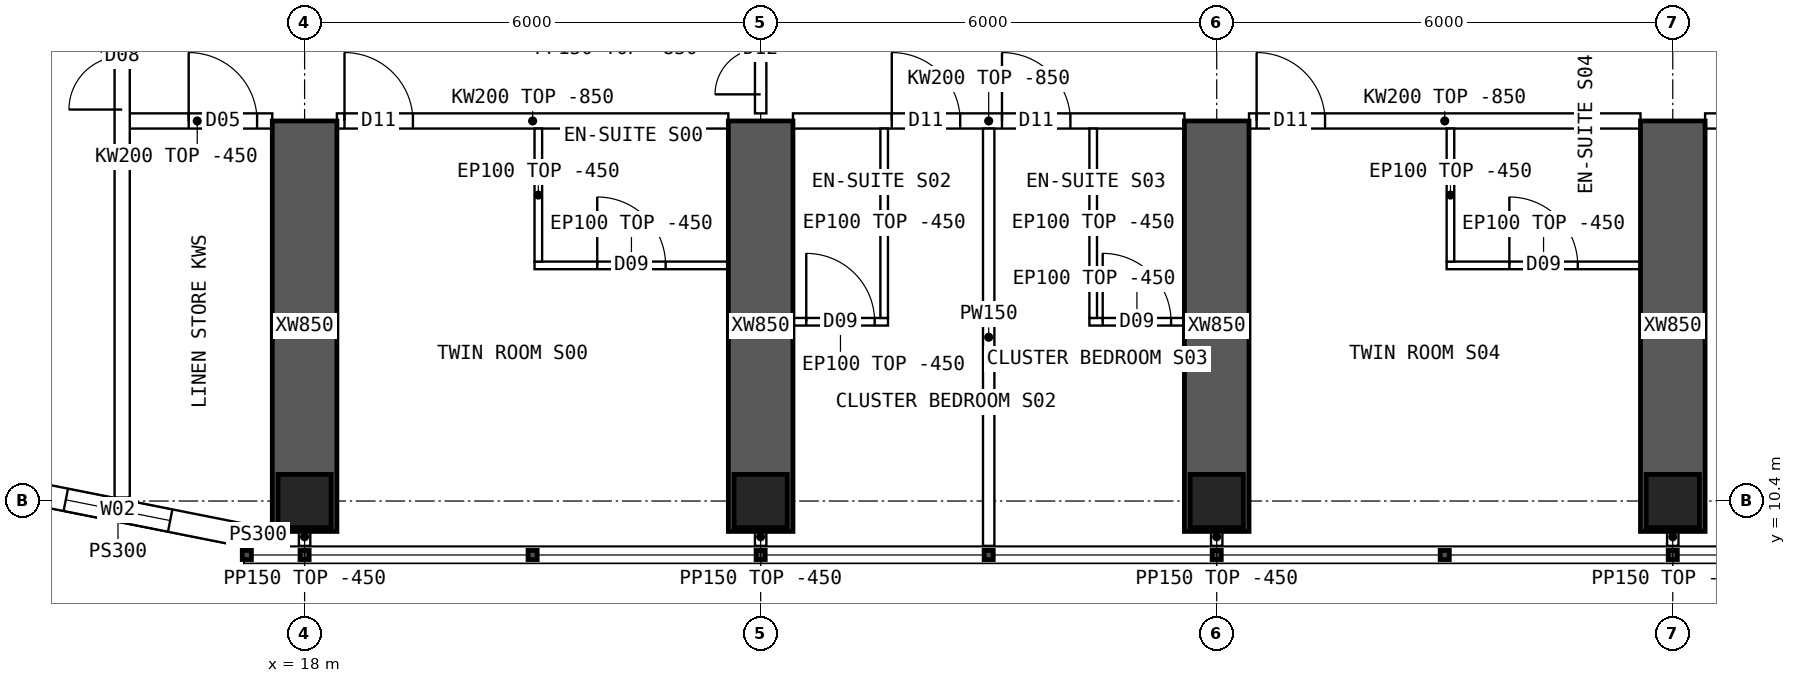
"""IFC4 building model, lengths in metres.
Left out: names, types, materials, properties, quantities, classifications, styles, units other than length and angle.
Written with IfcOpenShell. Run it as: python <this file> out.ifc"""

import sys

from ifc_helpers import new_model, si_unit, direction, frame, frame_2d, origin, origin_2d, place, context, subcontext, project, spatial, polyline, rectangle, hollow_rectangle, outline, extrude, element, fill, save


model = new_model("IFC4")
c1 = context("Model", 3, precision=1e-05, world=origin(), true_north=direction((0.0, 1.0)))
c2 = subcontext(c1, "Body", "Model", "MODEL_VIEW")
j1 = project(units=[si_unit("LENGTHUNIT", "METRE"), si_unit("PLANEANGLEUNIT", "RADIAN")], contexts=[c1])
p1 = place(None, origin())
s1 = spatial("IfcSite", under=j1, at=p1, CompositionType="ELEMENT")
p2 = place(p1, origin())
s2 = spatial("IfcBuilding", under=s1, at=p2, CompositionType="ELEMENT")
p3 = place(p2, frame((0.0, 0.0, 189.85)))
s3 = spatial("IfcBuildingStorey", under=s2, at=p3, CompositionType="ELEMENT", Elevation=189.85)
for number, where, z_axis, x_axis in (
    (1, (18.0, 10.4, 0.0), (0.0, 0.0, 1.0), (1.0, 0.0, 0.0)),
    (2, (24.0, 10.4, 0.0), (0.0, 0.0, 1.0), (1.0, 0.0, 0.0)),
    (3, (30.0, 10.4, 0.0), (0.0, 0.0, 1.0), (1.0, 0.0, 0.0)),
    (4, (36.0, 10.4, 0.0), (0.0, 0.0, 1.0), (1.0, 0.0, 0.0)),
):
    element("IfcColumn", number, at=place(p3, frame(where, z_axis=z_axis, x_axis=x_axis)), inside=s3, PredefinedType="COLUMN", context=c2, shape_type="SweptSolid", body=[
        extrude(hollow_rectangle(XDim=0.7, YDim=0.7, WallThickness=0.07, at=origin_2d()), origin(), (0.0, 0.0, 1.0), 3.75),
    ])
for number, where, z_axis, x_axis in (
    (5, (18.0, 10.0, 0.0), (0.0, 0.0, 1.0), (0.0, 1.0, 0.0)),
    (6, (24.0, 10.0, 0.0), (0.0, 0.0, 1.0), (0.0, 1.0, 0.0)),
    (7, (30.0, 10.0, 0.0), (0.0, 0.0, 1.0), (0.0, 1.0, 0.0)),
    (8, (36.0, 10.0, 0.0), (0.0, 0.0, 1.0), (0.0, 1.0, 0.0)),
):
    element("IfcWall", number, at=place(p3, frame(where, z_axis=z_axis, x_axis=x_axis)), inside=s3, PredefinedType="SHEAR", context=c2, shape_type="SweptSolid", body=[
        extrude(rectangle(XDim=5.4, YDim=0.85, at=frame_2d((2.7, 0.0))), origin(), (0.0, 0.0, 1.0), 3.75),
    ])
p4 = place(p3, frame((13.89, 10.608, 0.0), z_axis=(0.0, 0.0, 1.0), x_axis=(0.98078325777, -0.195100490205, 0.0)))
e9 = element("IfcWall", 9, at=p4, inside=s3, PredefinedType="SOLIDWALL", context=c2, shape_type="SweptSolid", body=[
    extrude(outline(polyline([(-0.03, -0.15), (3.405, -0.15), (3.345, 0.15), (0.03, 0.15), (-0.03, -0.15)])), origin(), (0.0, 0.0, 1.0), 3.3),
])
p5 = place(p4, frame((0.988, 0.0, 0.9)))
e10 = element("IfcOpeningElement", 10, at=p5, cuts=e9, PredefinedType="OPENING", context=c2, shape_type="SweptSolid", body=[
    extrude(rectangle(XDim=1.4, YDim=1.8, at=frame_2d((0.7, 0.9))), frame((0.0, 0.16, 0.0), z_axis=(0.0, -1.0, 0.0), x_axis=(1.0, 0.0, 0.0)), (0.0, 0.0, 1.0), 0.32),
])
p6 = place(p3, frame((17.2, 9.95, 0.0), z_axis=(0.0, 0.0, 1.0), x_axis=(1.0, 0.0, 0.0)))
e11 = element("IfcWall", 11, at=p6, inside=s3, PredefinedType="SOLIDWALL", context=c2, shape_type="SweptSolid", body=[
    extrude(rectangle(XDim=0.375, YDim=0.3, at=frame_2d((0.188, 0.0))), origin(), (0.0, 0.0, 1.0), 3.3),
])
p7 = place(p3, frame((15.6, 15.4, 0.0), z_axis=(0.0, 0.0, 1.0), x_axis=(1.0, 0.0, 0.0)))
e12 = element("IfcWall", 12, at=p7, inside=s3, PredefinedType="SOLIDWALL", context=c2, shape_type="SweptSolid", body=[
    extrude(rectangle(XDim=1.975, YDim=0.2, at=frame_2d((0.987, 0.0))), origin(), (0.0, 0.0, 1.0), 3.3),
])
p8 = place(p7, frame((0.875, 0.0, 0.0)))
e13 = element("IfcOpeningElement", 13, at=p8, cuts=e12, PredefinedType="OPENING", context=c2, shape_type="SweptSolid", body=[
    extrude(rectangle(XDim=0.9, YDim=2.1, at=frame_2d((0.45, 1.05))), frame((0.0, 0.11, 0.0), z_axis=(0.0, -1.0, 0.0), x_axis=(1.0, 0.0, 0.0)), (0.0, 0.0, 1.0), 0.22),
])
p9 = place(p3, frame((18.425, 15.4, 0.0), z_axis=(0.0, 0.0, 1.0), x_axis=(1.0, 0.0, 0.0)))
e14 = element("IfcWall", 14, at=p9, inside=s3, PredefinedType="SOLIDWALL", context=c2, shape_type="SweptSolid", body=[
    extrude(outline(polyline([(0.0, 0.0), (5.15, 0.0), (5.15, 2.9), (0.0, 2.9), (0.0, 0.0)])), frame((0.0, 0.1, 0.0), z_axis=(0.0, -1.0, 0.0), x_axis=(1.0, 0.0, 0.0)), (0.0, 0.0, 1.0), 0.2),
])
p10 = place(p9, frame((0.1, 0.0, 0.0)))
e15 = element("IfcOpeningElement", 15, at=p10, cuts=e14, PredefinedType="OPENING", context=c2, shape_type="SweptSolid", body=[
    extrude(rectangle(XDim=0.9, YDim=2.1, at=frame_2d((0.45, 1.05))), frame((0.0, 0.11, 0.0), z_axis=(0.0, -1.0, 0.0), x_axis=(1.0, 0.0, 0.0)), (0.0, 0.0, 1.0), 0.22),
])
p11 = place(p3, frame((24.425, 15.4, 0.0), z_axis=(0.0, 0.0, 1.0), x_axis=(1.0, 0.0, 0.0)))
e16 = element("IfcWall", 16, at=p11, inside=s3, PredefinedType="SOLIDWALL", context=c2, shape_type="SweptSolid", body=[
    extrude(outline(polyline([(0.0, 0.0), (5.15, 0.0), (5.15, 2.9), (0.0, 2.9), (0.0, 0.0)])), frame((0.0, 0.1, 0.0), z_axis=(0.0, -1.0, 0.0), x_axis=(1.0, 0.0, 0.0)), (0.0, 0.0, 1.0), 0.2),
])
p12 = place(p11, frame((1.3, 0.0, 0.0)))
e17 = element("IfcOpeningElement", 17, at=p12, cuts=e16, PredefinedType="OPENING", context=c2, shape_type="SweptSolid", body=[
    extrude(rectangle(XDim=0.9, YDim=2.1, at=frame_2d((0.45, 1.05))), frame((0.0, 0.11, 0.0), z_axis=(0.0, -1.0, 0.0), x_axis=(1.0, 0.0, 0.0)), (0.0, 0.0, 1.0), 0.22),
])
p13 = place(p11, frame((2.75, 0.0, 0.0)))
e18 = element("IfcOpeningElement", 18, at=p13, cuts=e16, PredefinedType="OPENING", context=c2, shape_type="SweptSolid", body=[
    extrude(rectangle(XDim=0.9, YDim=2.1, at=frame_2d((0.45, 1.05))), frame((0.0, 0.11, 0.0), z_axis=(0.0, -1.0, 0.0), x_axis=(1.0, 0.0, 0.0)), (0.0, 0.0, 1.0), 0.22),
])
p14 = place(p3, frame((30.425, 15.4, 0.0), z_axis=(0.0, 0.0, 1.0), x_axis=(1.0, 0.0, 0.0)))
e19 = element("IfcWall", 19, at=p14, inside=s3, PredefinedType="SOLIDWALL", context=c2, shape_type="SweptSolid", body=[
    extrude(outline(polyline([(0.0, 0.0), (5.15, 0.0), (5.15, 2.9), (0.0, 2.9), (0.0, 0.0)])), frame((0.0, 0.1, 0.0), z_axis=(0.0, -1.0, 0.0), x_axis=(1.0, 0.0, 0.0)), (0.0, 0.0, 1.0), 0.2),
])
p15 = place(p14, frame((0.1, 0.0, 0.0)))
e20 = element("IfcOpeningElement", 20, at=p15, cuts=e19, PredefinedType="OPENING", context=c2, shape_type="SweptSolid", body=[
    extrude(rectangle(XDim=0.9, YDim=2.1, at=frame_2d((0.45, 1.05))), frame((0.0, 0.11, 0.0), z_axis=(0.0, -1.0, 0.0), x_axis=(1.0, 0.0, 0.0)), (0.0, 0.0, 1.0), 0.22),
])
p16 = place(p3, frame((36.425, 15.4, 0.0), z_axis=(0.0, 0.0, 1.0), x_axis=(1.0, 0.0, 0.0)))
e21 = element("IfcWall", 21, at=p16, inside=s3, PredefinedType="SOLIDWALL", context=c2, shape_type="SweptSolid", body=[
    extrude(outline(polyline([(0.0, 0.0), (5.15, 0.0), (5.15, 2.9), (0.0, 2.9), (0.0, 0.0)])), frame((0.0, 0.1, 0.0), z_axis=(0.0, -1.0, 0.0), x_axis=(1.0, 0.0, 0.0)), (0.0, 0.0, 1.0), 0.2),
])
p17 = place(p16, frame((0.3, 0.0, 0.0)))
e22 = element("IfcOpeningElement", 22, at=p17, cuts=e21, PredefinedType="OPENING", context=c2, shape_type="SweptSolid", body=[
    extrude(rectangle(XDim=1.0, YDim=2.1, at=frame_2d((0.5, 1.05))), frame((0.0, 0.11, 0.0), z_axis=(0.0, -1.0, 0.0), x_axis=(1.0, 0.0, 0.0)), (0.0, 0.0, 1.0), 0.22),
])
p18 = place(p3, frame((23.575, 13.5, 0.0), z_axis=(0.0, 0.0, 1.0), x_axis=(-1.0, 0.0, 0.0)))
e23 = element("IfcWall", 23, at=p18, inside=s3, PredefinedType="PARTITIONING", context=c2, shape_type="SweptSolid", body=[
    extrude(rectangle(XDim=2.55, YDim=0.1, at=frame_2d((1.275, 0.0))), origin(), (0.0, 0.0, 1.0), 3.3),
])
p19 = place(p18, frame((0.825, 0.0, 0.0)))
e24 = element("IfcOpeningElement", 24, at=p19, cuts=e23, PredefinedType="OPENING", context=c2, shape_type="SweptSolid", body=[
    extrude(rectangle(XDim=0.9, YDim=2.1, at=frame_2d((0.45, 1.05))), frame((0.0, 0.06, 0.0), z_axis=(0.0, -1.0, 0.0), x_axis=(1.0, 0.0, 0.0)), (0.0, 0.0, 1.0), 0.12),
])
p20 = place(p3, frame((21.075, 13.55, 0.0), z_axis=(0.0, 0.0, 1.0), x_axis=(0.0, 1.0, 0.0)))
e25 = element("IfcWall", 25, at=p20, inside=s3, PredefinedType="PARTITIONING", context=c2, shape_type="SweptSolid", body=[
    extrude(outline(polyline([(0.0, 0.0), (1.75, 0.0), (1.75, 2.9), (1.702, 2.9), (1.7, 3.3), (0.0, 3.3), (0.0, 0.0)])), frame((0.0, 0.05, 0.0), z_axis=(0.0, -1.0, 0.0), x_axis=(1.0, 0.0, 0.0)), (0.0, 0.0, 1.0), 0.1),
])
p21 = place(p3, frame((27.0, 9.81, 0.0), z_axis=(0.0, 0.0, 1.0), x_axis=(0.0, 1.0, 0.0)))
e26 = element("IfcWall", 26, at=p21, inside=s3, PredefinedType="PARTITIONING", context=c2, shape_type="SweptSolid", body=[
    extrude(outline(polyline([(0.0, 0.0), (5.49, 0.0), (5.49, 2.9), (5.442, 2.9), (5.44, 3.3), (0.792, 3.3), (0.79, 2.9), (0.392, 2.9), (0.39, 3.3), (0.0, 3.3), (0.0, 0.0)])), frame((0.0, 0.075, 0.0), z_axis=(0.0, -1.0, 0.0), x_axis=(1.0, 0.0, 0.0)), (0.0, 0.0, 1.0), 0.15),
])
p22 = place(p3, frame((25.675, 12.758, 0.0), z_axis=(0.0, 0.0, 1.0), x_axis=(-1.0, 0.0, 0.0)))
e27 = element("IfcWall", 27, at=p22, inside=s3, PredefinedType="PARTITIONING", context=c2, shape_type="SweptSolid", body=[
    extrude(rectangle(XDim=1.25, YDim=0.1, at=frame_2d((0.625, 0.0))), origin(), (0.0, 0.0, 1.0), 3.3),
])
p23 = place(p22, frame((0.175, 0.0, 0.0)))
e28 = element("IfcOpeningElement", 28, at=p23, cuts=e27, PredefinedType="OPENING", context=c2, shape_type="SweptSolid", body=[
    extrude(rectangle(XDim=0.9, YDim=2.1, at=frame_2d((0.45, 1.05))), frame((0.0, 0.06, 0.0), z_axis=(0.0, -1.0, 0.0), x_axis=(1.0, 0.0, 0.0)), (0.0, 0.0, 1.0), 0.12),
])
p24 = place(p3, frame((25.625, 12.808, 0.0), z_axis=(0.0, 0.0, 1.0), x_axis=(0.0, 1.0, 0.0)))
e29 = element("IfcWall", 29, at=p24, inside=s3, PredefinedType="PARTITIONING", context=c2, shape_type="SweptSolid", body=[
    extrude(outline(polyline([(0.0, 0.0), (2.492, 0.0), (2.492, 2.9), (2.444, 2.9), (2.442, 3.3), (0.0, 3.3), (0.0, 0.0)])), frame((0.0, 0.05, 0.0), z_axis=(0.0, -1.0, 0.0), x_axis=(1.0, 0.0, 0.0)), (0.0, 0.0, 1.0), 0.1),
])
p25 = place(p3, frame((29.575, 12.758, 0.0), z_axis=(0.0, 0.0, 1.0), x_axis=(-1.0, 0.0, 0.0)))
e30 = element("IfcWall", 30, at=p25, inside=s3, PredefinedType="PARTITIONING", context=c2, shape_type="SweptSolid", body=[
    extrude(rectangle(XDim=1.25, YDim=0.1, at=frame_2d((0.625, 0.0))), origin(), (0.0, 0.0, 1.0), 3.3),
])
p26 = place(p25, frame((0.175, 0.0, 0.0)))
e31 = element("IfcOpeningElement", 31, at=p26, cuts=e30, PredefinedType="OPENING", context=c2, shape_type="SweptSolid", body=[
    extrude(rectangle(XDim=0.9, YDim=2.1, at=frame_2d((0.45, 1.05))), frame((0.0, 0.06, 0.0), z_axis=(0.0, -1.0, 0.0), x_axis=(1.0, 0.0, 0.0)), (0.0, 0.0, 1.0), 0.12),
])
p27 = place(p3, frame((28.375, 12.808, 0.0), z_axis=(0.0, 0.0, 1.0), x_axis=(0.0, 1.0, 0.0)))
e32 = element("IfcWall", 32, at=p27, inside=s3, PredefinedType="PARTITIONING", context=c2, shape_type="SweptSolid", body=[
    extrude(outline(polyline([(0.0, 0.0), (2.492, 0.0), (2.492, 2.9), (2.444, 2.9), (2.442, 3.3), (0.0, 3.3), (0.0, 0.0)])), frame((0.0, 0.05, 0.0), z_axis=(0.0, -1.0, 0.0), x_axis=(1.0, 0.0, 0.0)), (0.0, 0.0, 1.0), 0.1),
])
p28 = place(p3, frame((35.575, 13.5, 0.0), z_axis=(0.0, 0.0, 1.0), x_axis=(-1.0, 0.0, 0.0)))
e33 = element("IfcWall", 33, at=p28, inside=s3, PredefinedType="PARTITIONING", context=c2, shape_type="SweptSolid", body=[
    extrude(rectangle(XDim=2.55, YDim=0.1, at=frame_2d((1.275, 0.0))), origin(), (0.0, 0.0, 1.0), 3.3),
])
p29 = place(p28, frame((0.825, 0.0, 0.0)))
e34 = element("IfcOpeningElement", 34, at=p29, cuts=e33, PredefinedType="OPENING", context=c2, shape_type="SweptSolid", body=[
    extrude(rectangle(XDim=0.9, YDim=2.1, at=frame_2d((0.45, 1.05))), frame((0.0, 0.06, 0.0), z_axis=(0.0, -1.0, 0.0), x_axis=(1.0, 0.0, 0.0)), (0.0, 0.0, 1.0), 0.12),
])
p30 = place(p3, frame((33.075, 13.55, 0.0), z_axis=(0.0, 0.0, 1.0), x_axis=(0.0, 1.0, 0.0)))
e35 = element("IfcWall", 35, at=p30, inside=s3, PredefinedType="PARTITIONING", context=c2, shape_type="SweptSolid", body=[
    extrude(outline(polyline([(0.0, 0.0), (1.75, 0.0), (1.75, 2.9), (1.702, 2.9), (1.7, 3.3), (0.0, 3.3), (0.0, 0.0)])), frame((0.0, 0.05, 0.0), z_axis=(0.0, -1.0, 0.0), x_axis=(1.0, 0.0, 0.0)), (0.0, 0.0, 1.0), 0.1),
])
p31 = place(p3, frame((24.0, 15.5, 0.0), z_axis=(0.0, 0.0, 1.0), x_axis=(0.0, 1.0, 0.0)))
e36 = element("IfcWall", 36, at=p31, inside=s3, PredefinedType="PARTITIONING", context=c2, shape_type="SweptSolid", body=[
    extrude(outline(polyline([(0.0, 0.0), (1.7, 0.0), (1.7, 2.9), (0.0, 2.9), (0.0, 0.0)])), frame((0.0, 0.075, 0.0), z_axis=(0.0, -1.0, 0.0), x_axis=(1.0, 0.0, 0.0)), (0.0, 0.0, 1.0), 0.15),
])
p32 = place(p31, frame((0.25, 0.0, 0.0)))
e37 = element("IfcOpeningElement", 37, at=p32, cuts=e36, PredefinedType="OPENING", context=c2, shape_type="SweptSolid", body=[
    extrude(rectangle(XDim=1.2, YDim=2.1, at=frame_2d((0.6, 1.05))), frame((0.0, 0.085, 0.0), z_axis=(0.0, -1.0, 0.0), x_axis=(1.0, 0.0, 0.0)), (0.0, 0.0, 1.0), 0.17),
])
p33 = place(p3, frame((15.6, 10.446, 0.0), z_axis=(0.0, 0.0, 1.0), x_axis=(0.0, 1.0, 0.0)))
e38 = element("IfcWall", 38, at=p33, inside=s3, PredefinedType="SOLIDWALL", context=c2, shape_type="SweptSolid", body=[
    extrude(rectangle(XDim=43.107, YDim=0.2, at=frame_2d((21.554, 0.0))), origin(), (0.0, 0.0, 1.0), 3.3),
])
p34 = place(p33, frame((5.104, 0.0, 0.0)))
e39 = element("IfcOpeningElement", 39, at=p34, cuts=e38, PredefinedType="OPENING", context=c2, shape_type="SweptSolid", body=[
    extrude(rectangle(XDim=1.4, YDim=2.1, at=frame_2d((0.7, 1.05))), frame((0.0, 0.11, 0.0), z_axis=(0.0, -1.0, 0.0), x_axis=(1.0, 0.0, 0.0)), (0.0, 0.0, 1.0), 0.22),
])
p35 = place(p33, frame((36.504, 0.0, 0.0)))
e40 = element("IfcOpeningElement", 40, at=p35, cuts=e38, PredefinedType="OPENING", context=c2, shape_type="SweptSolid", body=[
    extrude(rectangle(XDim=1.4, YDim=2.1, at=frame_2d((0.7, 1.05))), frame((0.0, 0.11, 0.0), z_axis=(0.0, -1.0, 0.0), x_axis=(1.0, 0.0, 0.0)), (0.0, 0.0, 1.0), 0.22),
])
for number, where, z_axis, x_axis in (
    (41, (18.0, 10.05, 0.0), (0.0, 0.0, 1.0), (0.0, -1.0, 0.0)),
    (42, (24.0, 10.05, 0.0), (0.0, 0.0, 1.0), (0.0, -1.0, 0.0)),
    (43, (30.0, 10.05, 0.0), (0.0, 0.0, 1.0), (0.0, -1.0, 0.0)),
    (44, (36.0, 10.05, 0.0), (0.0, 0.0, 1.0), (0.0, -1.0, 0.0)),
):
    element("IfcWall", number, at=place(p3, frame(where, z_axis=z_axis, x_axis=x_axis)), inside=s3, PredefinedType="PARTITIONING", context=c2, shape_type="SweptSolid", body=[
        extrude(rectangle(XDim=0.24, YDim=0.15, at=frame_2d((0.12, 0.0))), origin(), (0.0, 0.0, 1.0), 3.3),
    ])
p36 = place(p5, origin())
e45 = element("IfcWindow", 45, at=p36, inside=s3, PartitioningType="SINGLE_PANEL", PredefinedType="WINDOW", context=c2, shape_type="SweptSolid", body=[
    extrude(rectangle(XDim=1.4, YDim=1.8, at=frame_2d((0.7, 0.9))), frame((0.0, 0.03, 0.0), z_axis=(0.0, -1.0, 0.0), x_axis=(1.0, 0.0, 0.0)), (0.0, 0.0, 1.0), 0.06),
])
fill(e10, e45)
p37 = place(p19, origin())
e46 = element("IfcDoor", 46, at=p37, inside=s3, OperationType="SINGLE_SWING_RIGHT", PredefinedType="DOOR", context=c2, shape_type="SweptSolid", body=[
    extrude(rectangle(XDim=0.9, YDim=2.1, at=frame_2d((0.45, 1.05))), frame((0.0, 0.025, 0.0), z_axis=(0.0, -1.0, 0.0), x_axis=(1.0, 0.0, 0.0)), (0.0, 0.0, 1.0), 0.05),
])
fill(e24, e46)
p38 = place(p10, origin())
e47 = element("IfcDoor", 47, at=p38, inside=s3, OperationType="SINGLE_SWING_LEFT", PredefinedType="DOOR", context=c2, shape_type="SweptSolid", body=[
    extrude(rectangle(XDim=0.9, YDim=2.1, at=frame_2d((0.45, 1.05))), frame((0.0, 0.025, 0.0), z_axis=(0.0, -1.0, 0.0), x_axis=(1.0, 0.0, 0.0)), (0.0, 0.0, 1.0), 0.05),
])
fill(e15, e47)
p39 = place(p23, origin())
e48 = element("IfcDoor", 48, at=p39, inside=s3, OperationType="SINGLE_SWING_RIGHT", PredefinedType="DOOR", context=c2, shape_type="SweptSolid", body=[
    extrude(rectangle(XDim=0.9, YDim=2.1, at=frame_2d((0.45, 1.05))), frame((0.0, 0.025, 0.0), z_axis=(0.0, -1.0, 0.0), x_axis=(1.0, 0.0, 0.0)), (0.0, 0.0, 1.0), 0.05),
])
fill(e28, e48)
p40 = place(p12, origin())
e49 = element("IfcDoor", 49, at=p40, inside=s3, OperationType="SINGLE_SWING_LEFT", PredefinedType="DOOR", context=c2, shape_type="SweptSolid", body=[
    extrude(rectangle(XDim=0.9, YDim=2.1, at=frame_2d((0.45, 1.05))), frame((0.0, 0.025, 0.0), z_axis=(0.0, -1.0, 0.0), x_axis=(1.0, 0.0, 0.0)), (0.0, 0.0, 1.0), 0.05),
])
fill(e17, e49)
p41 = place(p26, origin())
e50 = element("IfcDoor", 50, at=p41, inside=s3, OperationType="SINGLE_SWING_RIGHT", PredefinedType="DOOR", context=c2, shape_type="SweptSolid", body=[
    extrude(rectangle(XDim=0.9, YDim=2.1, at=frame_2d((0.45, 1.05))), frame((0.0, 0.025, 0.0), z_axis=(0.0, -1.0, 0.0), x_axis=(1.0, 0.0, 0.0)), (0.0, 0.0, 1.0), 0.05),
])
fill(e31, e50)
p42 = place(p13, origin())
e51 = element("IfcDoor", 51, at=p42, inside=s3, OperationType="SINGLE_SWING_LEFT", PredefinedType="DOOR", context=c2, shape_type="SweptSolid", body=[
    extrude(rectangle(XDim=0.9, YDim=2.1, at=frame_2d((0.45, 1.05))), frame((0.0, 0.025, 0.0), z_axis=(0.0, -1.0, 0.0), x_axis=(1.0, 0.0, 0.0)), (0.0, 0.0, 1.0), 0.05),
])
fill(e18, e51)
p43 = place(p29, origin())
e52 = element("IfcDoor", 52, at=p43, inside=s3, OperationType="SINGLE_SWING_RIGHT", PredefinedType="DOOR", context=c2, shape_type="SweptSolid", body=[
    extrude(rectangle(XDim=0.9, YDim=2.1, at=frame_2d((0.45, 1.05))), frame((0.0, 0.025, 0.0), z_axis=(0.0, -1.0, 0.0), x_axis=(1.0, 0.0, 0.0)), (0.0, 0.0, 1.0), 0.05),
])
fill(e34, e52)
p44 = place(p15, origin())
e53 = element("IfcDoor", 53, at=p44, inside=s3, OperationType="SINGLE_SWING_LEFT", PredefinedType="DOOR", context=c2, shape_type="SweptSolid", body=[
    extrude(rectangle(XDim=0.9, YDim=2.1, at=frame_2d((0.45, 1.05))), frame((0.0, 0.025, 0.0), z_axis=(0.0, -1.0, 0.0), x_axis=(1.0, 0.0, 0.0)), (0.0, 0.0, 1.0), 0.05),
])
fill(e20, e53)
p45 = place(p32, origin())
e54 = element("IfcDoor", 54, at=p45, inside=s3, OperationType="DOUBLE_DOOR_SINGLE_SWING", PredefinedType="DOOR", context=c2, shape_type="SweptSolid", body=[
    extrude(rectangle(XDim=1.2, YDim=2.1, at=frame_2d((0.6, 1.05))), frame((0.0, 0.025, 0.0), z_axis=(0.0, -1.0, 0.0), x_axis=(1.0, 0.0, 0.0)), (0.0, 0.0, 1.0), 0.05),
])
fill(e37, e54)
p46 = place(p34, origin())
e55 = element("IfcDoor", 55, at=p46, inside=s3, OperationType="DOUBLE_DOOR_SINGLE_SWING", PredefinedType="DOOR", context=c2, shape_type="SweptSolid", body=[
    extrude(rectangle(XDim=1.4, YDim=2.1, at=frame_2d((0.7, 1.05))), frame((0.0, 0.025, 0.0), z_axis=(0.0, -1.0, 0.0), x_axis=(1.0, 0.0, 0.0)), (0.0, 0.0, 1.0), 0.05),
])
fill(e39, e55)
p47 = place(p8, origin())
e56 = element("IfcDoor", 56, at=p47, inside=s3, OperationType="SINGLE_SWING_LEFT", PredefinedType="DOOR", context=c2, shape_type="SweptSolid", body=[
    extrude(rectangle(XDim=0.9, YDim=2.1, at=frame_2d((0.45, 1.05))), frame((0.0, 0.025, 0.0), z_axis=(0.0, -1.0, 0.0), x_axis=(1.0, 0.0, 0.0)), (0.0, 0.0, 1.0), 0.05),
])
fill(e13, e56)
save(model, sys.argv[1])
